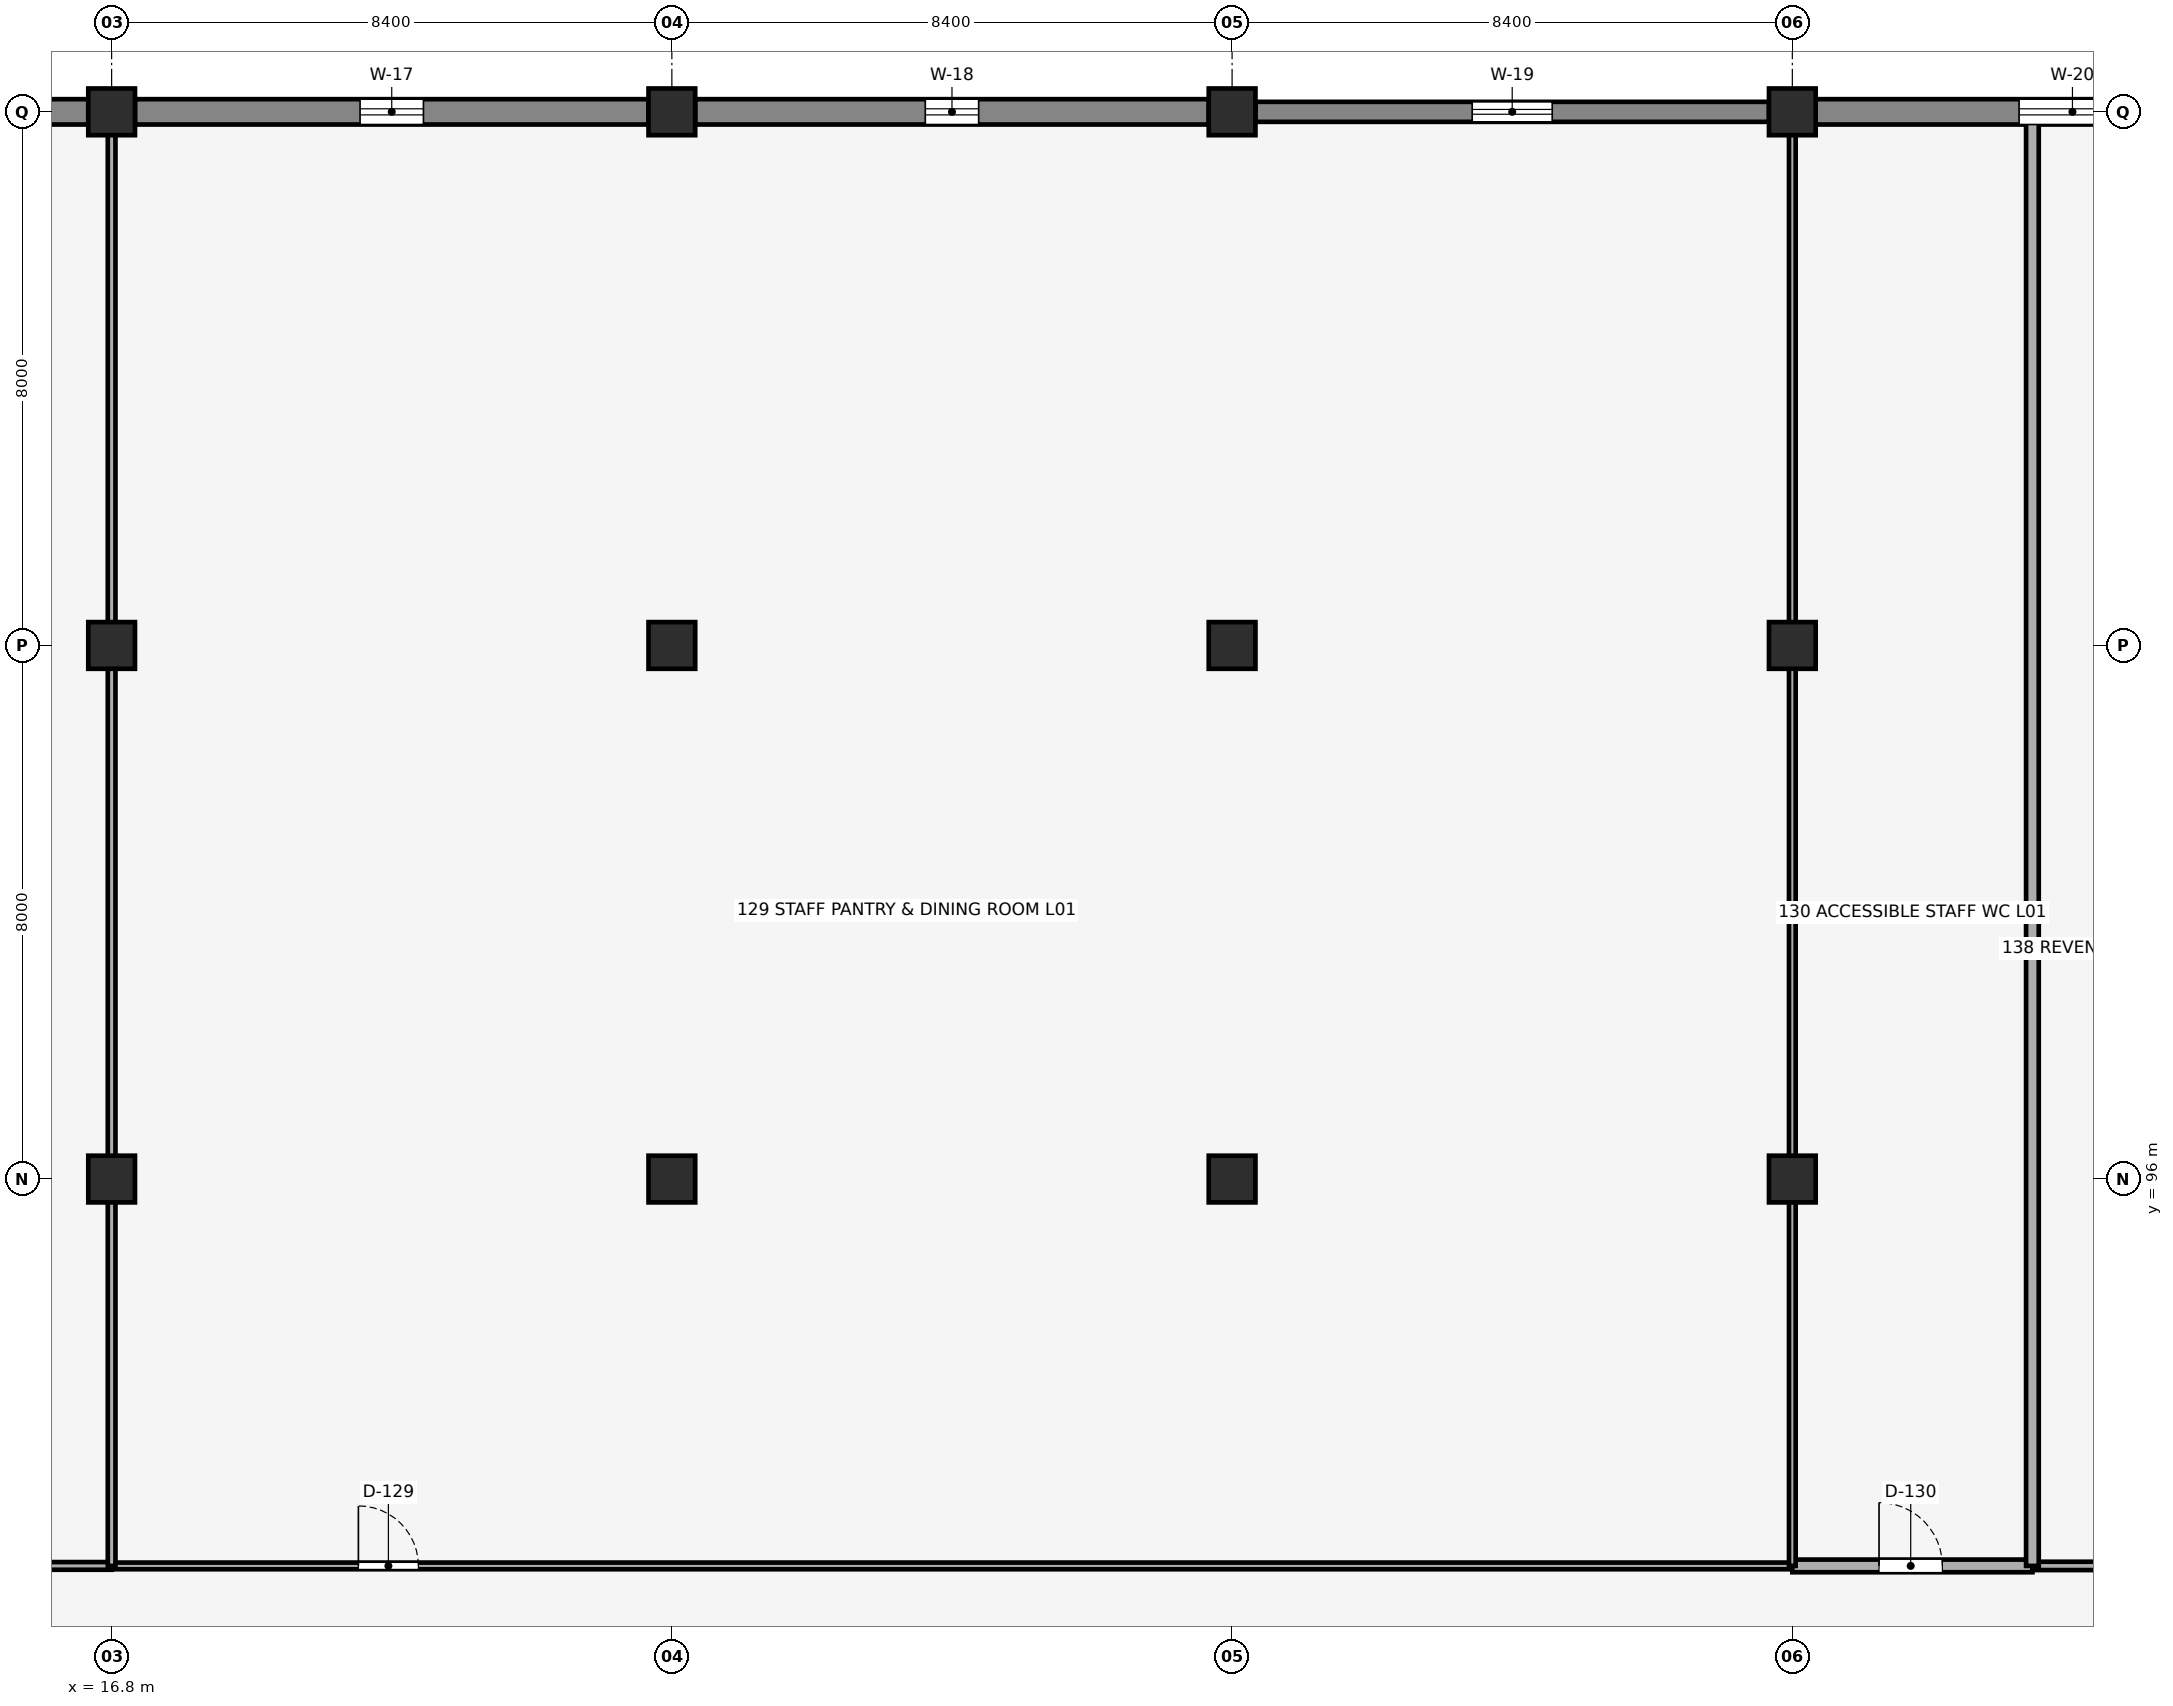
"""IFC4 building model, lengths in metres.
Left out: names, types, materials, properties, quantities, classifications, styles, units other than length and angle.
Written with IfcOpenShell. Run it as: python <this file> out.ifc"""

import sys

from ifc_helpers import new_model, si_unit, direction, frame, frame_2d, origin, origin_2d, place, context, subcontext, project, spatial, rectangle, extrude, element, fill, save


model = new_model("IFC4")
c1 = context("Model", 3, precision=1e-05, world=origin(), true_north=direction((0.0, 1.0)))
c2 = subcontext(c1, "Body", "Model", "MODEL_VIEW")
j1 = project(units=[si_unit("LENGTHUNIT", "METRE"), si_unit("PLANEANGLEUNIT", "RADIAN")], contexts=[c1])
p1 = place(None, origin())
s1 = spatial("IfcSite", under=j1, at=p1, CompositionType="ELEMENT")
p2 = place(p1, origin())
s2 = spatial("IfcBuilding", under=s1, at=p2, CompositionType="ELEMENT")
p3 = place(p2, frame((0.0, 0.0, 5.44)))
s3 = spatial("IfcBuildingStorey", under=s2, at=p3, CompositionType="ELEMENT", Elevation=5.44)
for number, where, z_axis, x_axis in (
    (1, (16.8, 96.0, 0.0), (0.0, 0.0, 1.0), (1.0, 0.0, 0.0)),
    (2, (16.8, 104.0, 0.0), (0.0, 0.0, 1.0), (1.0, 0.0, 0.0)),
    (3, (16.8, 112.0, 0.0), (0.0, 0.0, 1.0), (1.0, 0.0, 0.0)),
    (4, (25.2, 96.0, 0.0), (0.0, 0.0, 1.0), (1.0, 0.0, 0.0)),
    (5, (25.2, 104.0, 0.0), (0.0, 0.0, 1.0), (1.0, 0.0, 0.0)),
    (6, (25.2, 112.0, 0.0), (0.0, 0.0, 1.0), (1.0, 0.0, 0.0)),
    (7, (33.6, 96.0, 0.0), (0.0, 0.0, 1.0), (1.0, 0.0, 0.0)),
    (8, (33.6, 104.0, 0.0), (0.0, 0.0, 1.0), (1.0, 0.0, 0.0)),
    (9, (33.6, 112.0, 0.0), (0.0, 0.0, 1.0), (1.0, 0.0, 0.0)),
    (10, (42.0, 96.0, 0.0), (0.0, 0.0, 1.0), (1.0, 0.0, 0.0)),
    (11, (42.0, 104.0, 0.0), (0.0, 0.0, 1.0), (1.0, 0.0, 0.0)),
    (12, (42.0, 112.0, 0.0), (0.0, 0.0, 1.0), (1.0, 0.0, 0.0)),
):
    element("IfcColumn", number, at=place(p3, frame(where, z_axis=z_axis, x_axis=x_axis)), inside=s3, PredefinedType="COLUMN", context=c2, shape_type="SweptSolid", body=[
        extrude(rectangle(XDim=0.7, YDim=0.7, at=origin_2d()), origin(), (0.0, 0.0, 1.0), 3.8),
    ])
p4 = place(p3, frame((8.75, 112.0, 0.0), z_axis=(0.0, 0.0, 1.0), x_axis=(1.0, 0.0, 0.0)))
e13 = element("IfcWall", 13, at=p4, inside=s3, PredefinedType="SOLIDWALL", context=c2, shape_type="SweptSolid", body=[
    extrude(rectangle(XDim=7.7, YDim=0.38, at=frame_2d((3.85, 0.0))), origin(), (0.0, 0.0, 1.0), 3.45),
])
p5 = place(p4, frame((2.8, 0.0, 1.55), z_axis=(0.0, 0.0, 1.0), x_axis=(1.0, 0.0, 0.0)))
e14 = element("IfcOpeningElement", 14, at=p5, cuts=e13, PredefinedType="OPENING", context=c2, shape_type="SweptSolid", body=[
    extrude(rectangle(XDim=2.1, YDim=0.8, at=frame_2d((1.05, 0.4))), frame((0.0, 0.2, 0.0), z_axis=(0.0, -1.0, 0.0), x_axis=(1.0, 0.0, 0.0)), (0.0, 0.0, 1.0), 0.4),
])
p6 = place(p3, frame((17.15, 112.0, 0.0), z_axis=(0.0, 0.0, 1.0), x_axis=(1.0, 0.0, 0.0)))
e15 = element("IfcWall", 15, at=p6, inside=s3, PredefinedType="SOLIDWALL", context=c2, shape_type="SweptSolid", body=[
    extrude(rectangle(XDim=7.7, YDim=0.38, at=frame_2d((3.85, 0.0))), origin(), (0.0, 0.0, 1.0), 3.45),
])
p7 = place(p6, frame((3.375, 0.0, 0.65), z_axis=(0.0, 0.0, 1.0), x_axis=(1.0, 0.0, 0.0)))
e16 = element("IfcOpeningElement", 16, at=p7, cuts=e15, PredefinedType="OPENING", context=c2, shape_type="SweptSolid", body=[
    extrude(rectangle(XDim=0.95, YDim=2.1, at=frame_2d((0.475, 1.05))), frame((0.0, 0.2, 0.0), z_axis=(0.0, -1.0, 0.0), x_axis=(1.0, 0.0, 0.0)), (0.0, 0.0, 1.0), 0.4),
])
p8 = place(p3, frame((25.55, 112.0, 0.0), z_axis=(0.0, 0.0, 1.0), x_axis=(1.0, 0.0, 0.0)))
e17 = element("IfcWall", 17, at=p8, inside=s3, PredefinedType="SOLIDWALL", context=c2, shape_type="SweptSolid", body=[
    extrude(rectangle(XDim=7.7, YDim=0.38, at=frame_2d((3.85, 0.0))), origin(), (0.0, 0.0, 1.0), 3.45),
])
p9 = place(p8, frame((3.45, 0.0, 0.65), z_axis=(0.0, 0.0, 1.0), x_axis=(1.0, 0.0, 0.0)))
e18 = element("IfcOpeningElement", 18, at=p9, cuts=e17, PredefinedType="OPENING", context=c2, shape_type="SweptSolid", body=[
    extrude(rectangle(XDim=0.8, YDim=1.85, at=frame_2d((0.4, 0.925))), frame((0.0, 0.2, 0.0), z_axis=(0.0, -1.0, 0.0), x_axis=(1.0, 0.0, 0.0)), (0.0, 0.0, 1.0), 0.4),
])
p10 = place(p3, frame((33.95, 112.0, 0.0), z_axis=(0.0, 0.0, 1.0), x_axis=(1.0, 0.0, 0.0)))
e19 = element("IfcWall", 19, at=p10, inside=s3, PredefinedType="SOLIDWALL", context=c2, shape_type="SweptSolid", body=[
    extrude(rectangle(XDim=7.7, YDim=0.3, at=frame_2d((3.85, 0.0))), origin(), (0.0, 0.0, 1.0), 3.45),
])
p11 = place(p10, frame((3.25, 0.0, 1.55), z_axis=(0.0, 0.0, 1.0), x_axis=(1.0, 0.0, 0.0)))
e20 = element("IfcOpeningElement", 20, at=p11, cuts=e19, PredefinedType="OPENING", context=c2, shape_type="SweptSolid", body=[
    extrude(rectangle(XDim=1.2, YDim=0.95, at=frame_2d((0.6, 0.475))), frame((0.0, 0.16, 0.0), z_axis=(0.0, -1.0, 0.0), x_axis=(1.0, 0.0, 0.0)), (0.0, 0.0, 1.0), 0.32),
])
p12 = place(p3, frame((42.35, 112.0, 0.0), z_axis=(0.0, 0.0, 1.0), x_axis=(1.0, 0.0, 0.0)))
e21 = element("IfcWall", 21, at=p12, inside=s3, PredefinedType="SOLIDWALL", context=c2, shape_type="SweptSolid", body=[
    extrude(rectangle(XDim=7.7, YDim=0.38, at=frame_2d((3.85, 0.0))), origin(), (0.0, 0.0, 1.0), 3.45),
])
p13 = place(p12, frame((3.05, 0.0, 0.9), z_axis=(0.0, 0.0, 1.0), x_axis=(1.0, 0.0, 0.0)))
e22 = element("IfcOpeningElement", 22, at=p13, cuts=e21, PredefinedType="OPENING", context=c2, shape_type="SweptSolid", body=[
    extrude(rectangle(XDim=1.6, YDim=1.2, at=frame_2d((0.8, 0.6))), frame((0.0, 0.2, 0.0), z_axis=(0.0, -1.0, 0.0), x_axis=(1.0, 0.0, 0.0)), (0.0, 0.0, 1.0), 0.4),
])
p14 = place(p3, frame((8.4, 90.2, 0.0), z_axis=(0.0, 0.0, 1.0), x_axis=(1.0, 0.0, 0.0)))
e23 = element("IfcWall", 23, at=p14, inside=s3, PredefinedType="PARTITIONING", context=c2, shape_type="SweptSolid", body=[
    extrude(rectangle(XDim=8.4, YDim=0.115, at=frame_2d((4.2, 0.0))), origin(), (0.0, 0.0, 1.0), 3.8),
])
p15 = place(p14, frame((3.7, 0.0, 0.0), z_axis=(0.0, 0.0, 1.0), x_axis=(1.0, 0.0, 0.0)))
e24 = element("IfcOpeningElement", 24, at=p15, cuts=e23, PredefinedType="OPENING", context=c2, shape_type="SweptSolid", body=[
    extrude(rectangle(XDim=0.92, YDim=2.12, at=frame_2d((0.46, 1.06))), frame((0.0, 0.067, 0.0), z_axis=(0.0, -1.0, 0.0), x_axis=(1.0, 0.0, 0.0)), (0.0, 0.0, 1.0), 0.135),
])
p16 = place(p3, frame((16.8, 90.2, 0.0), z_axis=(0.0, 0.0, 1.0), x_axis=(1.0, 0.0, 0.0)))
e25 = element("IfcWall", 25, at=p16, inside=s3, PredefinedType="PARTITIONING", context=c2, shape_type="SweptSolid", body=[
    extrude(rectangle(XDim=25.2, YDim=0.1, at=frame_2d((12.6, 0.0))), origin(), (0.0, 0.0, 1.0), 3.337),
])
p17 = place(p16, frame((3.7, 0.0, 0.0), z_axis=(0.0, 0.0, 1.0), x_axis=(1.0, 0.0, 0.0)))
e26 = element("IfcOpeningElement", 26, at=p17, cuts=e25, PredefinedType="OPENING", context=c2, shape_type="SweptSolid", body=[
    extrude(rectangle(XDim=0.9, YDim=2.1, at=frame_2d((0.45, 1.05))), frame((0.0, 0.06, 0.0), z_axis=(0.0, -1.0, 0.0), x_axis=(1.0, 0.0, 0.0)), (0.0, 0.0, 1.0), 0.12),
])
p18 = place(p3, frame((42.0, 90.2, 0.0), z_axis=(0.0, 0.0, 1.0), x_axis=(1.0, 0.0, 0.0)))
e27 = element("IfcWall", 27, at=p18, inside=s3, PredefinedType="PLUMBINGWALL", context=c2, shape_type="SweptSolid", body=[
    extrude(rectangle(XDim=3.6, YDim=0.19, at=frame_2d((1.8, 0.0))), origin(), (0.0, 0.0, 1.0), 3.8),
])
p19 = place(p18, frame((1.3, 0.0, 0.0), z_axis=(0.0, 0.0, 1.0), x_axis=(1.0, 0.0, 0.0)))
e28 = element("IfcOpeningElement", 28, at=p19, cuts=e27, PredefinedType="OPENING", context=c2, shape_type="SweptSolid", body=[
    extrude(rectangle(XDim=0.95, YDim=2.15, at=frame_2d((0.475, 1.075))), frame((0.0, 0.105, 0.0), z_axis=(0.0, -1.0, 0.0), x_axis=(1.0, 0.0, 0.0)), (0.0, 0.0, 1.0), 0.21),
])
p20 = place(p3, frame((45.6, 90.2, 0.0), z_axis=(0.0, 0.0, 1.0), x_axis=(1.0, 0.0, 0.0)))
e29 = element("IfcWall", 29, at=p20, inside=s3, PredefinedType="PARTITIONING", context=c2, shape_type="SweptSolid", body=[
    extrude(rectangle(XDim=4.76, YDim=0.125, at=frame_2d((2.38, 0.0))), origin(), (0.0, 0.0, 1.0), 3.8),
])
p21 = place(p20, frame((1.88, 0.0, 0.0), z_axis=(0.0, 0.0, 1.0), x_axis=(1.0, 0.0, 0.0)))
e30 = element("IfcOpeningElement", 30, at=p21, cuts=e29, PredefinedType="OPENING", context=c2, shape_type="SweptSolid", body=[
    extrude(rectangle(XDim=0.95, YDim=2.15, at=frame_2d((0.475, 1.075))), frame((0.0, 0.073, 0.0), z_axis=(0.0, -1.0, 0.0), x_axis=(1.0, 0.0, 0.0)), (0.0, 0.0, 1.0), 0.145),
])
p22 = place(p3, frame((16.8, 90.2, 0.0), z_axis=(0.0, 0.0, 1.0), x_axis=(0.0, 1.0, 0.0)))
e31 = element("IfcWall", 31, at=p22, inside=s3, PredefinedType="PARTITIONING", context=c2, shape_type="SweptSolid", body=[
    extrude(rectangle(XDim=5.46, YDim=0.115, at=frame_2d((2.73, 0.0))), origin(), (0.0, 0.0, 1.0), 3.337),
])
for number, where, z_axis, x_axis in (
    (32, (16.8, 96.34, 0.0), (0.0, 0.0, 1.0), (0.0, 1.0, 0.0)),
    (33, (16.8, 104.34, 0.0), (0.0, 0.0, 1.0), (0.0, 1.0, 0.0)),
):
    element("IfcWall", number, at=place(p3, frame(where, z_axis=z_axis, x_axis=x_axis)), inside=s3, PredefinedType="PARTITIONING", context=c2, shape_type="SweptSolid", body=[
        extrude(rectangle(XDim=7.32, YDim=0.115, at=frame_2d((3.66, 0.0))), origin(), (0.0, 0.0, 1.0), 3.337),
    ])
p23 = place(p3, frame((42.0, 90.2, 0.0), z_axis=(0.0, 0.0, 1.0), x_axis=(0.0, 1.0, 0.0)))
e34 = element("IfcWall", 34, at=p23, inside=s3, PredefinedType="PARTITIONING", context=c2, shape_type="SweptSolid", body=[
    extrude(rectangle(XDim=5.46, YDim=0.1, at=frame_2d((2.73, 0.0))), origin(), (0.0, 0.0, 1.0), 3.337),
])
for number, where, z_axis, x_axis in (
    (35, (42.0, 96.34, 0.0), (0.0, 0.0, 1.0), (0.0, 1.0, 0.0)),
    (36, (42.0, 104.34, 0.0), (0.0, 0.0, 1.0), (0.0, 1.0, 0.0)),
):
    element("IfcWall", number, at=place(p3, frame(where, z_axis=z_axis, x_axis=x_axis)), inside=s3, PredefinedType="PARTITIONING", context=c2, shape_type="SweptSolid", body=[
        extrude(rectangle(XDim=7.32, YDim=0.1, at=frame_2d((3.66, 0.0))), origin(), (0.0, 0.0, 1.0), 3.337),
    ])
p24 = place(p3, frame((45.6, 90.2, 0.0), z_axis=(0.0, 0.0, 1.0), x_axis=(0.0, 1.0, 0.0)))
e37 = element("IfcWall", 37, at=p24, inside=s3, PredefinedType="PLUMBINGWALL", context=c2, shape_type="SweptSolid", body=[
    extrude(rectangle(XDim=21.76, YDim=0.19, at=frame_2d((10.88, 0.0))), origin(), (0.0, 0.0, 1.0), 3.8),
])
p25 = place(p7, origin())
e38 = element("IfcWindow", 38, at=p25, inside=s3, PartitioningType="SINGLE_PANEL", PredefinedType="WINDOW", context=c2, shape_type="SweptSolid", body=[
    extrude(rectangle(XDim=0.95, YDim=2.1, at=frame_2d((0.475, 1.05))), frame((0.0, 0.03, 0.0), z_axis=(0.0, -1.0, 0.0), x_axis=(1.0, 0.0, 0.0)), (0.0, 0.0, 1.0), 0.06),
])
fill(e16, e38)
p26 = place(p9, origin())
e39 = element("IfcWindow", 39, at=p26, inside=s3, PartitioningType="SINGLE_PANEL", PredefinedType="WINDOW", context=c2, shape_type="SweptSolid", body=[
    extrude(rectangle(XDim=0.8, YDim=1.85, at=frame_2d((0.4, 0.925))), frame((0.0, 0.03, 0.0), z_axis=(0.0, -1.0, 0.0), x_axis=(1.0, 0.0, 0.0)), (0.0, 0.0, 1.0), 0.06),
])
fill(e18, e39)
p27 = place(p11, origin())
e40 = element("IfcWindow", 40, at=p27, inside=s3, PartitioningType="SINGLE_PANEL", PredefinedType="WINDOW", context=c2, shape_type="SweptSolid", body=[
    extrude(rectangle(XDim=1.2, YDim=0.95, at=frame_2d((0.6, 0.475))), frame((0.0, 0.03, 0.0), z_axis=(0.0, -1.0, 0.0), x_axis=(1.0, 0.0, 0.0)), (0.0, 0.0, 1.0), 0.06),
])
fill(e20, e40)
p28 = place(p13, origin())
e41 = element("IfcWindow", 41, at=p28, inside=s3, PartitioningType="DOUBLE_PANEL_VERTICAL", PredefinedType="WINDOW", context=c2, shape_type="SweptSolid", body=[
    extrude(rectangle(XDim=1.6, YDim=1.2, at=frame_2d((0.8, 0.6))), frame((0.0, 0.03, 0.0), z_axis=(0.0, -1.0, 0.0), x_axis=(1.0, 0.0, 0.0)), (0.0, 0.0, 1.0), 0.06),
])
fill(e22, e41)
p29 = place(p17, origin())
e42 = element("IfcDoor", 42, at=p29, inside=s3, OperationType="SINGLE_SWING_LEFT", PredefinedType="DOOR", context=c2, shape_type="SweptSolid", body=[
    extrude(rectangle(XDim=0.9, YDim=2.1, at=frame_2d((0.45, 1.05))), frame((0.0, 0.025, 0.0), z_axis=(0.0, -1.0, 0.0), x_axis=(1.0, 0.0, 0.0)), (0.0, 0.0, 1.0), 0.05),
])
fill(e26, e42)
p30 = place(p19, origin())
e43 = element("IfcDoor", 43, at=p30, inside=s3, OperationType="SINGLE_SWING_LEFT", PredefinedType="DOOR", context=c2, shape_type="SweptSolid", body=[
    extrude(rectangle(XDim=0.95, YDim=2.15, at=frame_2d((0.475, 1.075))), frame((0.0, 0.025, 0.0), z_axis=(0.0, -1.0, 0.0), x_axis=(1.0, 0.0, 0.0)), (0.0, 0.0, 1.0), 0.05),
])
fill(e28, e43)
save(model, sys.argv[1])
